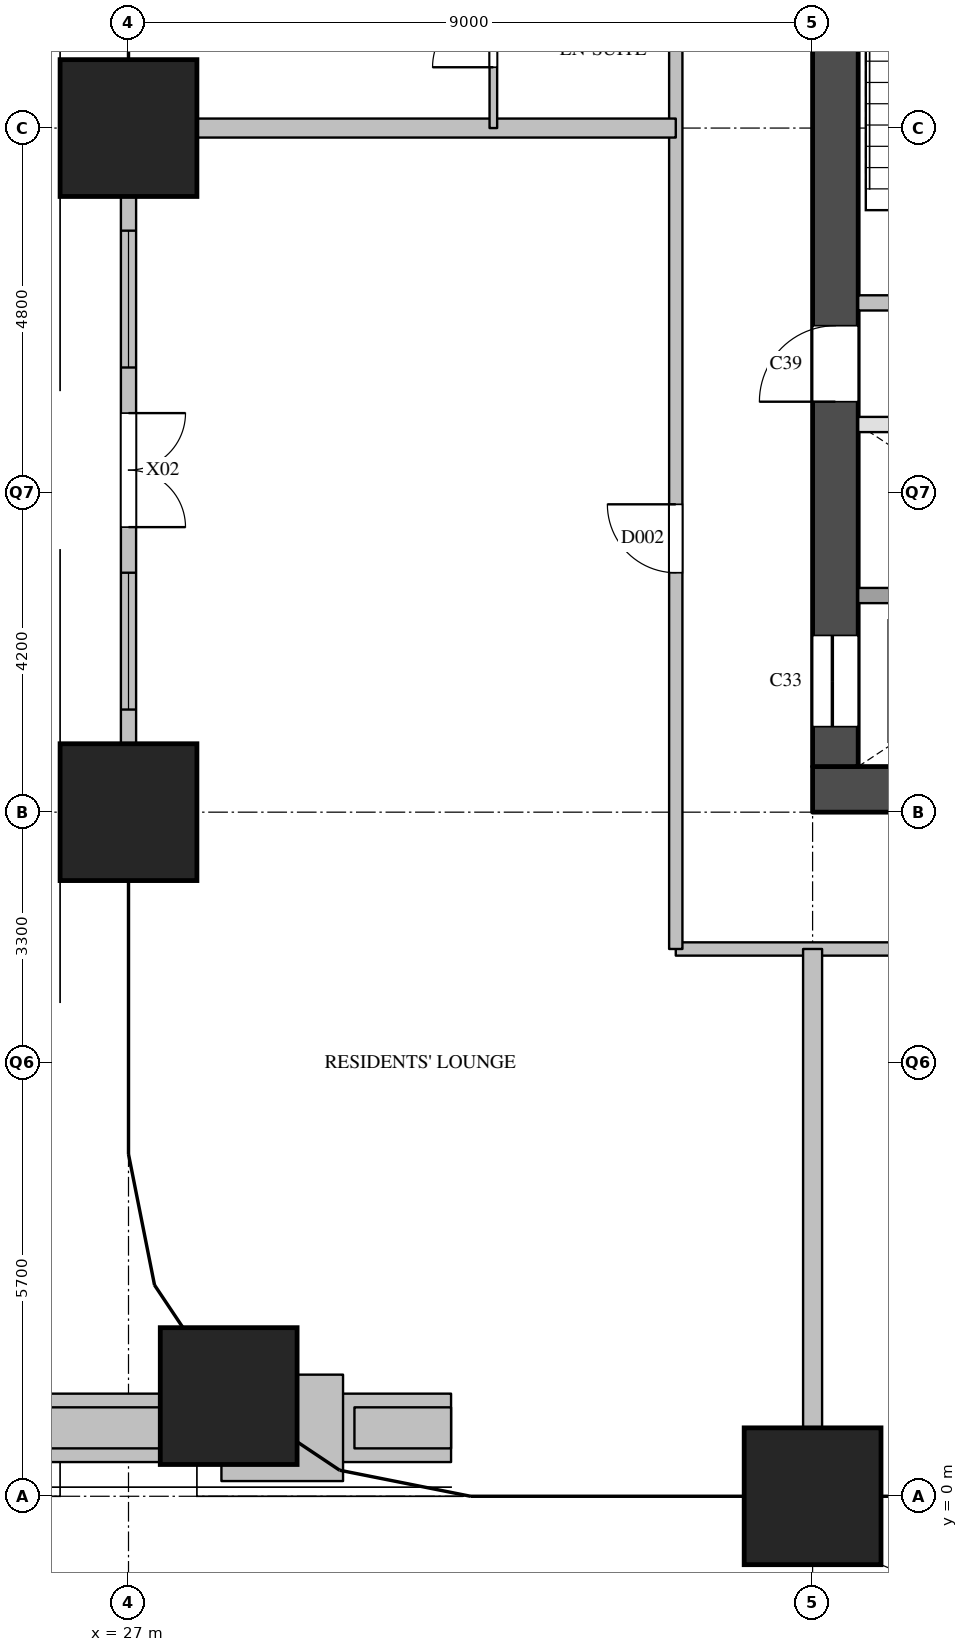
"""IFC4 building model, lengths in metres.
Left out: names, types, materials, properties, quantities, classifications, styles, units other than length and angle.
Written with IfcOpenShell. Run it as: python <this file> out.ifc"""

import sys

from ifc_helpers import new_model, si_unit, direction, frame, frame_2d, origin, origin_2d, place, context, subcontext, project, spatial, rectangle, extrude, element, fill, save


model = new_model("IFC4")
c1 = context("Model", 3, precision=1e-05, world=origin(), true_north=direction((0.0, 1.0)))
c2 = subcontext(c1, "Body", "Model", "MODEL_VIEW")
j1 = project(units=[si_unit("LENGTHUNIT", "METRE"), si_unit("PLANEANGLEUNIT", "RADIAN")], contexts=[c1])
p1 = place(None, origin())
s1 = spatial("IfcSite", under=j1, at=p1, CompositionType="ELEMENT")
p2 = place(p1, origin())
s2 = spatial("IfcBuilding", under=s1, at=p2, CompositionType="ELEMENT")
p3 = place(p2, frame((0.0, 0.0, 77.8)))
s3 = spatial("IfcBuildingStorey", under=s2, at=p3, CompositionType="ELEMENT", Elevation=77.8)
for number, where, z_axis, x_axis in (
    (1, (28.318, 1.318, 0.0), (0.0, 0.0, 1.0), (1.0, 0.0, 0.0)),
    (2, (27.0, 9.0, 0.0), (0.0, 0.0, 1.0), (1.0, 0.0, 0.0)),
    (3, (27.0, 18.0, 0.0), (0.0, 0.0, 1.0), (1.0, 0.0, 0.0)),
    (4, (36.0, 0.0, 0.0), (0.0, 0.0, 1.0), (1.0, 0.0, 0.0)),
):
    element("IfcColumn", number, at=place(p3, frame(where, z_axis=z_axis, x_axis=x_axis)), inside=s3, PredefinedType="COLUMN", context=c2, shape_type="SweptSolid", body=[
        extrude(rectangle(XDim=1.8, YDim=1.8, at=origin_2d()), origin(), (0.0, 0.0, 1.0), 3.8),
    ])
p4 = place(p3, frame((27.0, 17.1, 0.0), z_axis=(0.0, 0.0, 1.0), x_axis=(0.0, -1.0, 0.0)))
e5 = element("IfcWall", 5, at=p4, inside=s3, PredefinedType="SOLIDWALL", context=c2, shape_type="SweptSolid", body=[
    extrude(rectangle(XDim=7.2, YDim=0.2, at=frame_2d((3.6, 0.0))), origin(), (0.0, 0.0, 1.0), 2.5),
])
p5 = place(p4, frame((2.85, 0.0, 0.0)))
e6 = element("IfcOpeningElement", 6, at=p5, cuts=e5, PredefinedType="OPENING", context=c2, shape_type="SweptSolid", body=[
    extrude(rectangle(XDim=1.5, YDim=2.1, at=frame_2d((0.75, 1.05))), frame((0.0, 0.11, 0.0), z_axis=(0.0, -1.0, 0.0), x_axis=(1.0, 0.0, 0.0)), (0.0, 0.0, 1.0), 0.22),
])
p6 = place(p4, frame((0.45, 0.0, 0.1)))
e7 = element("IfcOpeningElement", 7, at=p6, cuts=e5, PredefinedType="OPENING", context=c2, shape_type="SweptSolid", body=[
    extrude(rectangle(XDim=1.8, YDim=2.1, at=frame_2d((0.9, 1.05))), frame((0.0, 0.11, 0.0), z_axis=(0.0, -1.0, 0.0), x_axis=(1.0, 0.0, 0.0)), (0.0, 0.0, 1.0), 0.22),
])
p7 = place(p4, frame((4.95, 0.0, 0.1)))
e8 = element("IfcOpeningElement", 8, at=p7, cuts=e5, PredefinedType="OPENING", context=c2, shape_type="SweptSolid", body=[
    extrude(rectangle(XDim=1.8, YDim=2.1, at=frame_2d((0.9, 1.05))), frame((0.0, 0.11, 0.0), z_axis=(0.0, -1.0, 0.0), x_axis=(1.0, 0.0, 0.0)), (0.0, 0.0, 1.0), 0.22),
])
p8 = place(p3, frame((31.244, 0.9, 0.0), z_axis=(0.0, 0.0, 1.0), x_axis=(-1.0, 0.0, 0.0)))
e9 = element("IfcWall", 9, at=p8, inside=s3, PredefinedType="SOLIDWALL", context=c2, shape_type="SweptSolid", body=[
    extrude(rectangle(XDim=26.654, YDim=0.9, at=frame_2d((13.327, 0.0))), origin(), (0.0, 0.0, 1.0), 0.6),
])
p9 = place(p3, frame((31.244, 0.9, 0.6), z_axis=(0.0, 0.0, 1.0), x_axis=(-1.0, 0.0, 0.0)))
e10 = element("IfcWall", 10, at=p9, inside=s3, PredefinedType="SOLIDWALL", context=c2, shape_type="SweptSolid", body=[
    extrude(rectangle(XDim=1.271, YDim=0.54, at=frame_2d((0.636, 0.0))), origin(), (0.0, 0.0, 1.0), 0.75),
])
p10 = place(p3, frame((28.073, 0.9, 0.6), z_axis=(0.0, 0.0, 1.0), x_axis=(-1.0, 0.0, 0.0)))
e11 = element("IfcWall", 11, at=p10, inside=s3, PredefinedType="SOLIDWALL", context=c2, shape_type="SweptSolid", body=[
    extrude(rectangle(XDim=2.542, YDim=0.54, at=frame_2d((1.271, 0.0))), origin(), (0.0, 0.0, 1.0), 0.75),
])
p11 = place(p3, frame((29.823, 0.9, 0.6), z_axis=(0.0, 0.0, 1.0), x_axis=(-1.0, 0.0, 0.0)))
e12 = element("IfcWall", 12, at=p11, inside=s3, PredefinedType="SOLIDWALL", context=c2, shape_type="SweptSolid", body=[
    extrude(rectangle(XDim=1.6, YDim=1.4, at=frame_2d((0.8, 0.0))), origin(), (0.0, 0.0, 1.0), 2.6),
])
p12 = place(p3, frame((36.0, 9.3, 0.0), z_axis=(0.0, 0.0, 1.0), x_axis=(1.0, 0.0, 0.0)))
e13 = element("IfcWall", 13, at=p12, inside=s3, PredefinedType="SHEAR", context=c2, shape_type="SweptSolid", body=[
    extrude(rectangle(XDim=9.0, YDim=0.6, at=frame_2d((4.5, 0.0))), origin(), (0.0, 0.0, 1.0), 3.5),
])
p13 = place(p3, frame((36.3, 9.6, 0.0), z_axis=(0.0, 0.0, 1.0), x_axis=(0.0, 1.0, 0.0)))
e14 = element("IfcWall", 14, at=p13, inside=s3, PredefinedType="SHEAR", context=c2, shape_type="SweptSolid", body=[
    extrude(rectangle(XDim=12.3, YDim=0.6, at=frame_2d((6.15, 0.0))), origin(), (0.0, 0.0, 1.0), 3.5),
])
p14 = place(p13, frame((0.525, 0.0, 0.0)))
e15 = element("IfcOpeningElement", 15, at=p14, cuts=e14, PredefinedType="OPENING", context=c2, shape_type="SweptSolid", body=[
    extrude(rectangle(XDim=1.2, YDim=2.1, at=frame_2d((0.6, 1.05))), frame((0.0, 0.31, 0.0), z_axis=(0.0, -1.0, 0.0), x_axis=(1.0, 0.0, 0.0)), (0.0, 0.0, 1.0), 0.62),
])
p15 = place(p13, frame((4.8, 0.0, 0.0)))
e16 = element("IfcOpeningElement", 16, at=p15, cuts=e14, PredefinedType="OPENING", context=c2, shape_type="SweptSolid", body=[
    extrude(rectangle(XDim=1.0, YDim=2.1, at=frame_2d((0.5, 1.05))), frame((0.0, 0.31, 0.0), z_axis=(0.0, -1.0, 0.0), x_axis=(1.0, 0.0, 0.0)), (0.0, 0.0, 1.0), 0.62),
])
p16 = place(p3, frame((36.6, 11.85, 0.0), z_axis=(0.0, 0.0, 1.0), x_axis=(1.0, 0.0, 0.0)))
e17 = element("IfcWall", 17, at=p16, inside=s3, PredefinedType="SOLIDWALL", context=c2, shape_type="SweptSolid", body=[
    extrude(rectangle(XDim=7.8, YDim=0.2, at=frame_2d((3.9, 0.0))), origin(), (0.0, 0.0, 1.0), 3.5),
])
p17 = place(p3, frame((36.6, 14.1, 0.0), z_axis=(0.0, 0.0, 1.0), x_axis=(1.0, 0.0, 0.0)))
e18 = element("IfcWall", 18, at=p17, inside=s3, PredefinedType="PARTITIONING", context=c2, shape_type="SweptSolid", body=[
    extrude(rectangle(XDim=6.0, YDim=0.2, at=frame_2d((3.0, 0.0))), origin(), (0.0, 0.0, 1.0), 3.5),
])
p18 = place(p17, frame((2.55, 0.0, 0.0)))
e19 = element("IfcOpeningElement", 19, at=p18, cuts=e18, PredefinedType="OPENING", context=c2, shape_type="SweptSolid", body=[
    extrude(rectangle(XDim=0.9, YDim=2.1, at=frame_2d((0.45, 1.05))), frame((0.0, 0.11, 0.0), z_axis=(0.0, -1.0, 0.0), x_axis=(1.0, 0.0, 0.0)), (0.0, 0.0, 1.0), 0.22),
])
p19 = place(p3, frame((36.6, 15.7, 0.0), z_axis=(0.0, 0.0, 1.0), x_axis=(1.0, 0.0, 0.0)))
e20 = element("IfcWall", 20, at=p19, inside=s3, PredefinedType="SOLIDWALL", context=c2, shape_type="SweptSolid", body=[
    extrude(rectangle(XDim=6.3, YDim=0.2, at=frame_2d((3.15, 0.0))), origin(), (0.0, 0.0, 1.0), 3.5),
])
p20 = place(p19, frame((1.025, 0.0, 0.0)))
e21 = element("IfcOpeningElement", 21, at=p20, cuts=e20, PredefinedType="OPENING", context=c2, shape_type="SweptSolid", body=[
    extrude(rectangle(XDim=1.1, YDim=2.1, at=frame_2d((0.55, 1.05))), frame((0.0, 0.11, 0.0), z_axis=(0.0, -1.0, 0.0), x_axis=(1.0, 0.0, 0.0)), (0.0, 0.0, 1.0), 0.22),
])
p21 = place(p19, frame((4.175, 0.0, 0.0)))
e22 = element("IfcOpeningElement", 22, at=p21, cuts=e20, PredefinedType="OPENING", context=c2, shape_type="SweptSolid", body=[
    extrude(rectangle(XDim=1.1, YDim=2.1, at=frame_2d((0.55, 1.05))), frame((0.0, 0.11, 0.0), z_axis=(0.0, -1.0, 0.0), x_axis=(1.0, 0.0, 0.0)), (0.0, 0.0, 1.0), 0.22),
])
p22 = place(p3, frame((34.2, 7.2, 0.0), z_axis=(0.0, 0.0, 1.0), x_axis=(1.0, 0.0, 0.0)))
e23 = element("IfcWall", 23, at=p22, inside=s3, PredefinedType="PARTITIONING", context=c2, shape_type="SweptSolid", body=[
    extrude(rectangle(XDim=12.6, YDim=0.175, at=frame_2d((6.3, 0.0))), origin(), (0.0, 0.0, 1.0), 3.5),
])
p23 = place(p3, frame((34.2, 7.2, 0.0), z_axis=(0.0, 0.0, 1.0), x_axis=(0.0, 1.0, 0.0)))
e24 = element("IfcWall", 24, at=p23, inside=s3, PredefinedType="PARTITIONING", context=c2, shape_type="SweptSolid", body=[
    extrude(rectangle(XDim=16.49, YDim=0.175, at=frame_2d((8.245, 0.0))), origin(), (0.0, 0.0, 1.0), 3.5),
])
p24 = place(p23, frame((4.95, 0.0, 0.0)))
e25 = element("IfcOpeningElement", 25, at=p24, cuts=e24, PredefinedType="OPENING", context=c2, shape_type="SweptSolid", body=[
    extrude(rectangle(XDim=0.9, YDim=2.1, at=frame_2d((0.45, 1.05))), frame((0.0, 0.097, 0.0), z_axis=(0.0, -1.0, 0.0), x_axis=(1.0, 0.0, 0.0)), (0.0, 0.0, 1.0), 0.195),
])
p25 = place(p23, frame((14.345, 0.0, 0.0)))
e26 = element("IfcOpeningElement", 26, at=p25, cuts=e24, PredefinedType="OPENING", context=c2, shape_type="SweptSolid", body=[
    extrude(rectangle(XDim=1.0, YDim=2.1, at=frame_2d((0.5, 1.05))), frame((0.0, 0.097, 0.0), z_axis=(0.0, -1.0, 0.0), x_axis=(1.0, 0.0, 0.0)), (0.0, 0.0, 1.0), 0.195),
])
for number, where, z_axis, x_axis in (
    (27, (27.0, 18.0, 0.0), (0.0, 0.0, 1.0), (1.0, 0.0, 0.0)),
    (28, (36.0, 0.0, 0.0), (0.0, 0.0, 1.0), (0.0, 1.0, 0.0)),
):
    element("IfcWall", number, at=place(p3, frame(where, z_axis=z_axis, x_axis=x_axis)), inside=s3, PredefinedType="PARTITIONING", context=c2, shape_type="SweptSolid", body=[
        extrude(rectangle(XDim=7.2, YDim=0.25, at=frame_2d((3.6, 0.0))), origin(), (0.0, 0.0, 1.0), 3.5),
    ])
p26 = place(p3, frame((31.8, 18.0, 0.0), z_axis=(0.0, 0.0, 1.0), x_axis=(0.0, 1.0, 0.0)))
e29 = element("IfcWall", 29, at=p26, inside=s3, PredefinedType="PARTITIONING", context=c2, shape_type="SweptSolid", body=[
    extrude(rectangle(XDim=2.4, YDim=0.1, at=frame_2d((1.2, 0.0))), origin(), (0.0, 0.0, 1.0), 3.5),
])
p27 = place(p26, frame((0.8, 0.0, 0.0)))
e30 = element("IfcOpeningElement", 30, at=p27, cuts=e29, PredefinedType="OPENING", context=c2, shape_type="SweptSolid", body=[
    extrude(rectangle(XDim=0.8, YDim=2.1, at=frame_2d((0.4, 1.05))), frame((0.0, 0.06, 0.0), z_axis=(0.0, -1.0, 0.0), x_axis=(1.0, 0.0, 0.0)), (0.0, 0.0, 1.0), 0.12),
])
p28 = place(p5, origin())
e31 = element("IfcDoor", 31, at=p28, inside=s3, OperationType="DOUBLE_DOOR_SINGLE_SWING", PredefinedType="DOOR", context=c2, shape_type="SweptSolid", body=[
    extrude(rectangle(XDim=1.5, YDim=2.1, at=frame_2d((0.75, 1.05))), frame((0.0, 0.025, 0.0), z_axis=(0.0, -1.0, 0.0), x_axis=(1.0, 0.0, 0.0)), (0.0, 0.0, 1.0), 0.05),
])
fill(e6, e31)
p29 = place(p6, origin())
e32 = element("IfcWindow", 32, at=p29, inside=s3, PartitioningType="SINGLE_PANEL", PredefinedType="WINDOW", context=c2, shape_type="SweptSolid", body=[
    extrude(rectangle(XDim=1.8, YDim=2.1, at=frame_2d((0.9, 1.05))), frame((0.0, 0.03, 0.0), z_axis=(0.0, -1.0, 0.0), x_axis=(1.0, 0.0, 0.0)), (0.0, 0.0, 1.0), 0.06),
])
fill(e7, e32)
p30 = place(p7, origin())
e33 = element("IfcWindow", 33, at=p30, inside=s3, PartitioningType="SINGLE_PANEL", PredefinedType="WINDOW", context=c2, shape_type="SweptSolid", body=[
    extrude(rectangle(XDim=1.8, YDim=2.1, at=frame_2d((0.9, 1.05))), frame((0.0, 0.03, 0.0), z_axis=(0.0, -1.0, 0.0), x_axis=(1.0, 0.0, 0.0)), (0.0, 0.0, 1.0), 0.06),
])
fill(e8, e33)
p31 = place(p14, origin())
e34 = element("IfcDoor", 34, at=p31, inside=s3, OperationType="SLIDING_TO_LEFT", PredefinedType="DOOR", context=c2, shape_type="SweptSolid", body=[
    extrude(rectangle(XDim=1.2, YDim=2.1, at=frame_2d((0.6, 1.05))), frame((0.0, 0.025, 0.0), z_axis=(0.0, -1.0, 0.0), x_axis=(1.0, 0.0, 0.0)), (0.0, 0.0, 1.0), 0.05),
])
fill(e15, e34)
p32 = place(p15, origin())
e35 = element("IfcDoor", 35, at=p32, inside=s3, OperationType="SINGLE_SWING_LEFT", PredefinedType="DOOR", context=c2, shape_type="SweptSolid", body=[
    extrude(rectangle(XDim=1.0, YDim=2.1, at=frame_2d((0.5, 1.05))), frame((0.0, 0.025, 0.0), z_axis=(0.0, -1.0, 0.0), x_axis=(1.0, 0.0, 0.0)), (0.0, 0.0, 1.0), 0.05),
])
fill(e16, e35)
p33 = place(p24, origin())
e36 = element("IfcDoor", 36, at=p33, inside=s3, OperationType="SINGLE_SWING_RIGHT", PredefinedType="DOOR", context=c2, shape_type="SweptSolid", body=[
    extrude(rectangle(XDim=0.9, YDim=2.1, at=frame_2d((0.45, 1.05))), frame((0.0, 0.025, 0.0), z_axis=(0.0, -1.0, 0.0), x_axis=(1.0, 0.0, 0.0)), (0.0, 0.0, 1.0), 0.05),
])
fill(e25, e36)
p34 = place(p27, origin())
e37 = element("IfcDoor", 37, at=p34, inside=s3, OperationType="SINGLE_SWING_LEFT", PredefinedType="DOOR", context=c2, shape_type="SweptSolid", body=[
    extrude(rectangle(XDim=0.8, YDim=2.1, at=frame_2d((0.4, 1.05))), frame((0.0, 0.025, 0.0), z_axis=(0.0, -1.0, 0.0), x_axis=(1.0, 0.0, 0.0)), (0.0, 0.0, 1.0), 0.05),
])
fill(e30, e37)
save(model, sys.argv[1])
